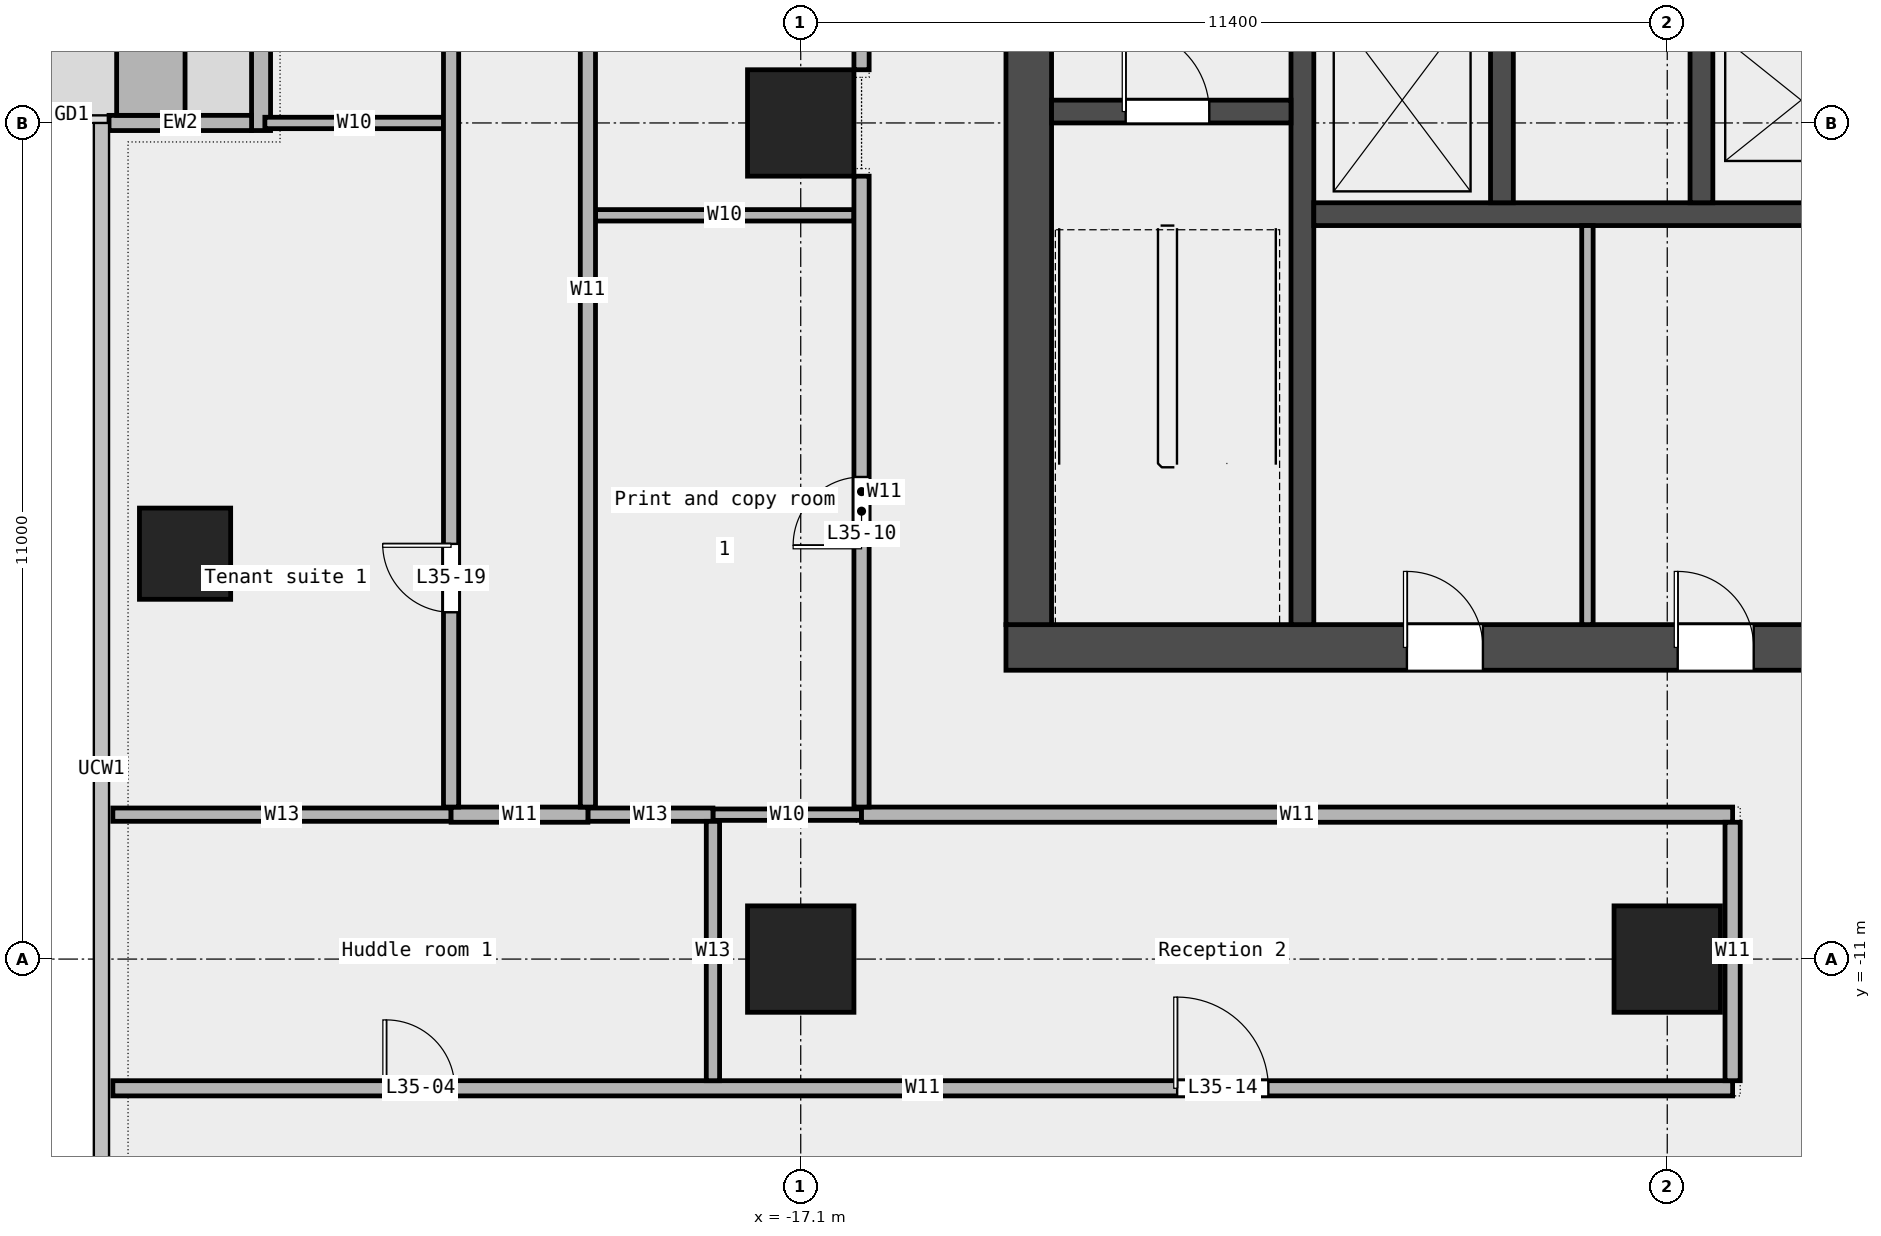
"""IFC4 building model, lengths in metres.
Left out: names, types, materials, properties, quantities, classifications, styles, units other than length and angle.
Written with IfcOpenShell. Run it as: python <this file> out.ifc"""

import sys

from ifc_helpers import new_model, si_unit, direction, frame, frame_2d, origin, origin_2d, place, context, subcontext, project, spatial, rectangle, extrude, element, fill, save


model = new_model("IFC4")
c1 = context("Model", 3, precision=1e-05, world=origin(), true_north=direction((0.0, 1.0)))
c2 = subcontext(c1, "Body", "Model", "MODEL_VIEW")
j1 = project(units=[si_unit("LENGTHUNIT", "METRE"), si_unit("PLANEANGLEUNIT", "RADIAN")], contexts=[c1])
p1 = place(None, origin())
s1 = spatial("IfcSite", under=j1, at=p1, CompositionType="ELEMENT")
p2 = place(p1, origin())
s2 = spatial("IfcBuilding", under=s1, at=p2, CompositionType="ELEMENT")
p3 = place(p2, frame((0.0, 0.0, 173.0)))
s3 = spatial("IfcBuildingStorey", under=s2, at=p3, CompositionType="ELEMENT", Elevation=173.0)
p4 = place(p3, frame((-25.2, -5.667, 0.0), z_axis=(0.0, 0.0, 1.0), x_axis=(1.0, 0.0, 0.0)))
e1 = element("IfcColumn", 1, at=p4, inside=s3, PredefinedType="COLUMN", context=c2, shape_type="SweptSolid", body=[
    extrude(rectangle(XDim=1.2, YDim=1.2, at=origin_2d()), origin(), (0.0, 0.0, 1.0), 3.6),
])
for number, where, z_axis, x_axis in (
    (2, (-17.1, -11.0, 0.0), (0.0, 0.0, 1.0), (1.0, 0.0, 0.0)),
    (3, (-17.1, 0.0, 0.0), (0.0, 0.0, 1.0), (1.0, 0.0, 0.0)),
    (4, (-5.7, -11.0, 0.0), (0.0, 0.0, 1.0), (1.0, 0.0, 0.0)),
):
    element("IfcColumn", number, at=place(p3, frame(where, z_axis=z_axis, x_axis=x_axis)), inside=s3, PredefinedType="COLUMN", context=c2, shape_type="SweptSolid", body=[
        extrude(rectangle(XDim=1.4, YDim=1.4, at=origin_2d()), origin(), (0.0, 0.0, 1.0), 3.6),
    ])
p5 = place(p3, frame((-24.2, 12.85, 0.0), z_axis=(0.0, 0.0, 1.0), x_axis=(0.0, -1.0, 0.0)))
e5 = element("IfcWall", 5, at=p5, inside=s3, PredefinedType="STANDARD", context=c2, shape_type="SweptSolid", body=[
    extrude(rectangle(XDim=12.95, YDim=0.25, at=frame_2d((6.475, 0.0))), origin(), (0.0, 0.0, 1.0), 3.6),
])
p6 = place(p5, frame((1.5, 0.0, 0.45)))
e6 = element("IfcOpeningElement", 6, at=p6, cuts=e5, PredefinedType="OPENING", context=c2, shape_type="SweptSolid", body=[
    extrude(rectangle(XDim=1.5, YDim=2.4, at=frame_2d((0.75, 1.2))), frame((0.0, 0.137, 0.0), z_axis=(0.0, -1.0, 0.0), x_axis=(1.0, 0.0, 0.0)), (0.0, 0.0, 1.0), 0.274),
])
p7 = place(p5, frame((4.25, 0.0, 0.0)))
e7 = element("IfcOpeningElement", 7, at=p7, cuts=e5, PredefinedType="OPENING", context=c2, shape_type="SweptSolid", body=[
    extrude(rectangle(XDim=1.8, YDim=2.4, at=frame_2d((0.9, 1.2))), frame((0.0, 0.137, 0.0), z_axis=(0.0, -1.0, 0.0), x_axis=(1.0, 0.0, 0.0)), (0.0, 0.0, 1.0), 0.274),
])
p8 = place(p5, frame((10.0, 0.0, 0.45)))
e8 = element("IfcOpeningElement", 8, at=p8, cuts=e5, PredefinedType="OPENING", context=c2, shape_type="SweptSolid", body=[
    extrude(rectangle(XDim=1.5, YDim=2.4, at=frame_2d((0.75, 1.2))), frame((0.0, 0.137, 0.0), z_axis=(0.0, -1.0, 0.0), x_axis=(1.0, 0.0, 0.0)), (0.0, 0.0, 1.0), 0.274),
])
p9 = place(p3, frame((-26.2, 0.0, 0.0), z_axis=(0.0, 0.0, 1.0), x_axis=(1.0, 0.0, 0.0)))
e9 = element("IfcWall", 9, at=p9, inside=s3, PredefinedType="STANDARD", context=c2, shape_type="SweptSolid", body=[
    extrude(rectangle(XDim=1.875, YDim=0.2, at=frame_2d((0.938, 0.0))), origin(), (0.0, 0.0, 1.0), 3.6),
])
p10 = place(p3, frame((-25.65, 3.7, 0.0), z_axis=(0.0, 0.0, 1.0), x_axis=(0.0, -1.0, 0.0)))
e10 = element("IfcWall", 10, at=p10, inside=s3, PredefinedType="STANDARD", context=c2, shape_type="SweptSolid", body=[
    extrude(rectangle(XDim=3.6, YDim=0.9, at=frame_2d((1.8, 0.0))), origin(), (0.0, 0.0, 1.0), 0.7),
])
p11 = place(p3, frame((-26.15, -12.7, 0.0), z_axis=(0.0, 0.0, 1.0), x_axis=(1.0, 0.0, 0.0)))
e11 = element("IfcWall", 11, at=p11, inside=s3, PredefinedType="PARTITIONING", context=c2, shape_type="SweptSolid", body=[
    extrude(rectangle(XDim=21.31, YDim=0.2, at=frame_2d((10.655, 0.0))), origin(), (0.0, 0.0, 1.0), 3.6),
])
p12 = place(p11, frame((3.597, 0.0, 0.0)))
e12 = element("IfcOpeningElement", 12, at=p12, cuts=e11, PredefinedType="OPENING", context=c2, shape_type="SweptSolid", body=[
    extrude(rectangle(XDim=0.9, YDim=2.1, at=frame_2d((0.45, 1.05))), frame((0.0, 0.112, 0.0), z_axis=(0.0, -1.0, 0.0), x_axis=(1.0, 0.0, 0.0)), (0.0, 0.0, 1.0), 0.224),
])
p13 = place(p11, frame((14.002, 0.0, 0.0)))
e13 = element("IfcOpeningElement", 13, at=p13, cuts=e11, PredefinedType="OPENING", context=c2, shape_type="SweptSolid", body=[
    extrude(rectangle(XDim=1.2, YDim=2.1, at=frame_2d((0.6, 1.05))), frame((0.0, 0.112, 0.0), z_axis=(0.0, -1.0, 0.0), x_axis=(1.0, 0.0, 0.0)), (0.0, 0.0, 1.0), 0.224),
])
p14 = place(p3, frame((-18.255, -9.1, 0.0), z_axis=(0.0, 0.0, 1.0), x_axis=(1.0, 0.0, 0.0)))
e14 = element("IfcWall", 14, at=p14, inside=s3, PredefinedType="PARTITIONING", context=c2, shape_type="SweptSolid", body=[
    extrude(rectangle(XDim=1.955, YDim=0.15, at=frame_2d((0.978, 0.0))), origin(), (0.0, 0.0, 1.0), 3.6),
])
p15 = place(p3, frame((-26.15, -9.1, 0.0), z_axis=(0.0, 0.0, 1.0), x_axis=(1.0, 0.0, 0.0)))
e15 = element("IfcWall", 15, at=p15, inside=s3, PredefinedType="PARTITIONING", context=c2, shape_type="SweptSolid", body=[
    extrude(rectangle(XDim=4.45, YDim=0.175, at=frame_2d((2.225, 0.0))), origin(), (0.0, 0.0, 1.0), 3.6),
])
p16 = place(p3, frame((-19.9, -9.1, 0.0), z_axis=(0.0, 0.0, 1.0), x_axis=(1.0, 0.0, 0.0)))
e16 = element("IfcWall", 16, at=p16, inside=s3, PredefinedType="PARTITIONING", context=c2, shape_type="SweptSolid", body=[
    extrude(rectangle(XDim=1.645, YDim=0.175, at=frame_2d((0.823, 0.0))), origin(), (0.0, 0.0, 1.0), 3.6),
])
p17 = place(p3, frame((-21.7, -9.1, 0.0), z_axis=(0.0, 0.0, 1.0), x_axis=(1.0, 0.0, 0.0)))
e17 = element("IfcWall", 17, at=p17, inside=s3, PredefinedType="PARTITIONING", context=c2, shape_type="SweptSolid", body=[
    extrude(rectangle(XDim=1.8, YDim=0.2, at=frame_2d((0.9, 0.0))), origin(), (0.0, 0.0, 1.0), 3.6),
])
p18 = place(p3, frame((-16.3, -9.1, 0.0), z_axis=(0.0, 0.0, 1.0), x_axis=(1.0, 0.0, 0.0)))
e18 = element("IfcWall", 18, at=p18, inside=s3, PredefinedType="PARTITIONING", context=c2, shape_type="SweptSolid", body=[
    extrude(rectangle(XDim=11.46, YDim=0.2, at=frame_2d((5.73, 0.0))), origin(), (0.0, 0.0, 1.0), 3.6),
])
p19 = place(p3, frame((-19.8, -1.215, 0.0), z_axis=(0.0, 0.0, 1.0), x_axis=(1.0, 0.0, 0.0)))
e19 = element("IfcWall", 19, at=p19, inside=s3, PredefinedType="PARTITIONING", context=c2, shape_type="SweptSolid", body=[
    extrude(rectangle(XDim=3.4, YDim=0.15, at=frame_2d((1.7, 0.0))), origin(), (0.0, 0.0, 1.0), 3.6),
])
p20 = place(p3, frame((-24.15, 0.0, 0.0), z_axis=(0.0, 0.0, 1.0), x_axis=(1.0, 0.0, 0.0)))
e20 = element("IfcWall", 20, at=p20, inside=s3, PredefinedType="PARTITIONING", context=c2, shape_type="SweptSolid", body=[
    extrude(rectangle(XDim=2.35, YDim=0.15, at=frame_2d((1.175, 0.0))), origin(), (0.0, 0.0, 1.0), 3.6),
])
p21 = place(p3, frame((-21.7, -9.0, 0.0), z_axis=(0.0, 0.0, 1.0), x_axis=(0.0, 1.0, 0.0)))
e21 = element("IfcWall", 21, at=p21, inside=s3, PredefinedType="PARTITIONING", context=c2, shape_type="SweptSolid", body=[
    extrude(rectangle(XDim=24.3, YDim=0.2, at=frame_2d((12.15, 0.0))), origin(), (0.0, 0.0, 1.0), 3.6),
])
p22 = place(p21, frame((14.925, 0.0, 0.0)))
e22 = element("IfcOpeningElement", 22, at=p22, cuts=e21, PredefinedType="OPENING", context=c2, shape_type="SweptSolid", body=[
    extrude(rectangle(XDim=0.9, YDim=2.1, at=frame_2d((0.45, 1.05))), frame((0.0, 0.112, 0.0), z_axis=(0.0, -1.0, 0.0), x_axis=(1.0, 0.0, 0.0)), (0.0, 0.0, 1.0), 0.224),
])
p23 = place(p21, frame((2.562, 0.0, 0.0)))
e23 = element("IfcOpeningElement", 23, at=p23, cuts=e21, PredefinedType="OPENING", context=c2, shape_type="SweptSolid", body=[
    extrude(rectangle(XDim=0.9, YDim=2.1, at=frame_2d((0.45, 1.05))), frame((0.0, 0.112, 0.0), z_axis=(0.0, -1.0, 0.0), x_axis=(1.0, 0.0, 0.0)), (0.0, 0.0, 1.0), 0.224),
])
p24 = place(p3, frame((-19.9, -9.0, 0.0), z_axis=(0.0, 0.0, 1.0), x_axis=(0.0, 1.0, 0.0)))
e24 = element("IfcWall", 24, at=p24, inside=s3, PredefinedType="PARTITIONING", context=c2, shape_type="SweptSolid", body=[
    extrude(rectangle(XDim=13.6, YDim=0.2, at=frame_2d((6.8, 0.0))), origin(), (0.0, 0.0, 1.0), 3.6),
])
p25 = place(p3, frame((-18.255, -12.6, 0.0), z_axis=(0.0, 0.0, 1.0), x_axis=(0.0, 1.0, 0.0)))
e25 = element("IfcWall", 25, at=p25, inside=s3, PredefinedType="PARTITIONING", context=c2, shape_type="SweptSolid", body=[
    extrude(rectangle(XDim=3.412, YDim=0.175, at=frame_2d((1.706, 0.0))), origin(), (0.0, 0.0, 1.0), 3.6),
])
p26 = place(p3, frame((-16.3, -9.0, 0.0), z_axis=(0.0, 0.0, 1.0), x_axis=(0.0, 1.0, 0.0)))
e26 = element("IfcWall", 26, at=p26, inside=s3, PredefinedType="PARTITIONING", context=c2, shape_type="SweptSolid", body=[
    extrude(rectangle(XDim=8.3, YDim=0.2, at=frame_2d((4.15, 0.0))), origin(), (0.0, 0.0, 1.0), 3.6),
])
p27 = place(p26, frame((3.442, 0.0, 0.0)))
e27 = element("IfcOpeningElement", 27, at=p27, cuts=e26, PredefinedType="OPENING", context=c2, shape_type="SweptSolid", body=[
    extrude(rectangle(XDim=0.9, YDim=2.1, at=frame_2d((0.45, 1.05))), frame((0.0, 0.112, 0.0), z_axis=(0.0, -1.0, 0.0), x_axis=(1.0, 0.0, 0.0)), (0.0, 0.0, 1.0), 0.224),
])
p28 = place(p3, frame((-16.3, 0.7, 0.0), z_axis=(0.0, 0.0, 1.0), x_axis=(0.0, 1.0, 0.0)))
e28 = element("IfcWall", 28, at=p28, inside=s3, PredefinedType="PARTITIONING", context=c2, shape_type="SweptSolid", body=[
    extrude(rectangle(XDim=3.9, YDim=0.2, at=frame_2d((1.95, 0.0))), origin(), (0.0, 0.0, 1.0), 3.6),
])
p29 = place(p28, frame((1.5, 0.0, 0.0)))
e29 = element("IfcOpeningElement", 29, at=p29, cuts=e28, PredefinedType="OPENING", context=c2, shape_type="SweptSolid", body=[
    extrude(rectangle(XDim=0.9, YDim=2.1, at=frame_2d((0.45, 1.05))), frame((0.0, 0.112, 0.0), z_axis=(0.0, -1.0, 0.0), x_axis=(1.0, 0.0, 0.0)), (0.0, 0.0, 1.0), 0.224),
])
p30 = place(p3, frame((-4.84, -12.6, 0.0), z_axis=(0.0, 0.0, 1.0), x_axis=(0.0, 1.0, 0.0)))
e30 = element("IfcWall", 30, at=p30, inside=s3, PredefinedType="PARTITIONING", context=c2, shape_type="SweptSolid", body=[
    extrude(rectangle(XDim=3.4, YDim=0.2, at=frame_2d((1.7, 0.0))), origin(), (0.0, 0.0, 1.0), 3.6),
])
p31 = place(p3, frame((-14.4, -6.9, 0.0), z_axis=(0.0, 0.0, 1.0), x_axis=(1.0, 0.0, 0.0)))
e31 = element("IfcWall", 31, at=p31, inside=s3, PredefinedType="SHEAR", context=c2, shape_type="SweptSolid", body=[
    extrude(rectangle(XDim=28.8, YDim=0.6, at=frame_2d((14.4, 0.0))), origin(), (0.0, 0.0, 1.0), 3.7),
])
p32 = place(p31, frame((5.275, 0.0, 0.0)))
e32 = element("IfcOpeningElement", 32, at=p32, cuts=e31, PredefinedType="OPENING", context=c2, shape_type="SweptSolid", body=[
    extrude(rectangle(XDim=1.0, YDim=2.1, at=frame_2d((0.5, 1.05))), frame((0.0, 0.312, 0.0), z_axis=(0.0, -1.0, 0.0), x_axis=(1.0, 0.0, 0.0)), (0.0, 0.0, 1.0), 0.624),
])
p33 = place(p31, frame((8.837, 0.0, 0.0)))
e33 = element("IfcOpeningElement", 33, at=p33, cuts=e31, PredefinedType="OPENING", context=c2, shape_type="SweptSolid", body=[
    extrude(rectangle(XDim=1.0, YDim=2.1, at=frame_2d((0.5, 1.05))), frame((0.0, 0.312, 0.0), z_axis=(0.0, -1.0, 0.0), x_axis=(1.0, 0.0, 0.0)), (0.0, 0.0, 1.0), 0.624),
])
p34 = place(p31, frame((13.425, 0.0, 0.0)))
e34 = element("IfcOpeningElement", 34, at=p34, cuts=e31, PredefinedType="OPENING", context=c2, shape_type="SweptSolid", body=[
    extrude(rectangle(XDim=1.2, YDim=2.1, at=frame_2d((0.6, 1.05))), frame((0.0, 0.312, 0.0), z_axis=(0.0, -1.0, 0.0), x_axis=(1.0, 0.0, 0.0)), (0.0, 0.0, 1.0), 0.624),
])
p35 = place(p31, frame((18.75, 0.0, 0.0)))
e35 = element("IfcOpeningElement", 35, at=p35, cuts=e31, PredefinedType="OPENING", context=c2, shape_type="SweptSolid", body=[
    extrude(rectangle(XDim=1.8, YDim=2.1, at=frame_2d((0.9, 1.05))), frame((0.0, 0.312, 0.0), z_axis=(0.0, -1.0, 0.0), x_axis=(1.0, 0.0, 0.0)), (0.0, 0.0, 1.0), 0.624),
])
p36 = place(p31, frame((23.087, 0.0, 0.0)))
e36 = element("IfcOpeningElement", 36, at=p36, cuts=e31, PredefinedType="OPENING", context=c2, shape_type="SweptSolid", body=[
    extrude(rectangle(XDim=1.0, YDim=2.1, at=frame_2d((0.5, 1.05))), frame((0.0, 0.312, 0.0), z_axis=(0.0, -1.0, 0.0), x_axis=(1.0, 0.0, 0.0)), (0.0, 0.0, 1.0), 0.624),
])
p37 = place(p3, frame((-14.1, -6.6, 0.0), z_axis=(0.0, 0.0, 1.0), x_axis=(0.0, 1.0, 0.0)))
e37 = element("IfcWall", 37, at=p37, inside=s3, PredefinedType="SHEAR", context=c2, shape_type="SweptSolid", body=[
    extrude(rectangle(XDim=19.5, YDim=0.6, at=frame_2d((9.75, 0.0))), origin(), (0.0, 0.0, 1.0), 3.7),
])
p38 = place(p37, frame((9.3, 0.0, 0.0)))
e38 = element("IfcOpeningElement", 38, at=p38, cuts=e37, PredefinedType="OPENING", context=c2, shape_type="SweptSolid", body=[
    extrude(rectangle(XDim=1.8, YDim=2.1, at=frame_2d((0.9, 1.05))), frame((0.0, 0.312, 0.0), z_axis=(0.0, -1.0, 0.0), x_axis=(1.0, 0.0, 0.0)), (0.0, 0.0, 1.0), 0.624),
])
p39 = place(p3, frame((-10.5, -6.6, 0.0), z_axis=(0.0, 0.0, 1.0), x_axis=(0.0, 1.0, 0.0)))
e39 = element("IfcWall", 39, at=p39, inside=s3, PredefinedType="SHEAR", context=c2, shape_type="SweptSolid", body=[
    extrude(rectangle(XDim=8.55, YDim=0.3, at=frame_2d((4.275, 0.0))), origin(), (0.0, 0.0, 1.0), 3.7),
])
p40 = place(p3, frame((-13.8, 0.15, 0.0), z_axis=(0.0, 0.0, 1.0), x_axis=(1.0, 0.0, 0.0)))
e40 = element("IfcWall", 40, at=p40, inside=s3, PredefinedType="SOLIDWALL", context=c2, shape_type="SweptSolid", body=[
    extrude(rectangle(XDim=3.15, YDim=0.3, at=frame_2d((1.575, 0.0))), origin(), (0.0, 0.0, 1.0), 3.7),
])
p41 = place(p40, frame((0.975, 0.0, 0.0)))
e41 = element("IfcOpeningElement", 41, at=p41, cuts=e40, PredefinedType="OPENING", context=c2, shape_type="SweptSolid", body=[
    extrude(rectangle(XDim=1.1, YDim=2.1, at=frame_2d((0.55, 1.05))), frame((0.0, 0.162, 0.0), z_axis=(0.0, -1.0, 0.0), x_axis=(1.0, 0.0, 0.0)), (0.0, 0.0, 1.0), 0.324),
])
p42 = place(p3, frame((-10.35, -1.2, 0.0), z_axis=(0.0, 0.0, 1.0), x_axis=(1.0, 0.0, 0.0)))
e42 = element("IfcWall", 42, at=p42, inside=s3, PredefinedType="SOLIDWALL", context=c2, shape_type="SweptSolid", body=[
    extrude(rectangle(XDim=20.7, YDim=0.3, at=frame_2d((10.35, 0.0))), origin(), (0.0, 0.0, 1.0), 3.7),
])
for number, where, z_axis, x_axis in (
    (43, (-7.875, -1.05, 0.0), (0.0, 0.0, 1.0), (0.0, 1.0, 0.0)),
    (44, (-5.25, -1.05, 0.0), (0.0, 0.0, 1.0), (0.0, 1.0, 0.0)),
):
    element("IfcWall", number, at=place(p3, frame(where, z_axis=z_axis, x_axis=x_axis)), inside=s3, PredefinedType="SOLIDWALL", context=c2, shape_type="SweptSolid", body=[
        extrude(rectangle(XDim=2.7, YDim=0.3, at=frame_2d((1.35, 0.0))), origin(), (0.0, 0.0, 1.0), 3.7),
    ])
p43 = place(p3, frame((-6.75, -6.6, 0.0), z_axis=(0.0, 0.0, 1.0), x_axis=(0.0, 1.0, 0.0)))
e45 = element("IfcWall", 45, at=p43, inside=s3, PredefinedType="PARTITIONING", context=c2, shape_type="SweptSolid", body=[
    extrude(rectangle(XDim=5.25, YDim=0.15, at=frame_2d((2.625, 0.0))), origin(), (0.0, 0.0, 1.0), 3.7),
])
p44 = place(p12, origin())
e46 = element("IfcDoor", 46, at=p44, inside=s3, OperationType="SINGLE_SWING_LEFT", PredefinedType="DOOR", context=c2, shape_type="SweptSolid", body=[
    extrude(rectangle(XDim=0.9, YDim=2.1, at=frame_2d((0.45, 1.05))), frame((0.0, 0.025, 0.0), z_axis=(0.0, -1.0, 0.0), x_axis=(1.0, 0.0, 0.0)), (0.0, 0.0, 1.0), 0.05),
])
fill(e12, e46)
p45 = place(p27, origin())
e47 = element("IfcDoor", 47, at=p45, inside=s3, OperationType="SINGLE_SWING_LEFT", PredefinedType="DOOR", context=c2, shape_type="SweptSolid", body=[
    extrude(rectangle(XDim=0.9, YDim=2.1, at=frame_2d((0.45, 1.05))), frame((0.0, 0.025, 0.0), z_axis=(0.0, -1.0, 0.0), x_axis=(1.0, 0.0, 0.0)), (0.0, 0.0, 1.0), 0.05),
])
fill(e27, e47)
p46 = place(p13, origin())
e48 = element("IfcDoor", 48, at=p46, inside=s3, OperationType="SINGLE_SWING_LEFT", PredefinedType="DOOR", context=c2, shape_type="SweptSolid", body=[
    extrude(rectangle(XDim=1.2, YDim=2.1, at=frame_2d((0.6, 1.05))), frame((0.0, 0.025, 0.0), z_axis=(0.0, -1.0, 0.0), x_axis=(1.0, 0.0, 0.0)), (0.0, 0.0, 1.0), 0.05),
])
fill(e13, e48)
p47 = place(p23, origin())
e49 = element("IfcDoor", 49, at=p47, inside=s3, OperationType="SINGLE_SWING_RIGHT", PredefinedType="DOOR", context=c2, shape_type="SweptSolid", body=[
    extrude(rectangle(XDim=0.9, YDim=2.1, at=frame_2d((0.45, 1.05))), frame((0.0, 0.025, 0.0), z_axis=(0.0, -1.0, 0.0), x_axis=(1.0, 0.0, 0.0)), (0.0, 0.0, 1.0), 0.05),
])
fill(e23, e49)
p48 = place(p41, origin())
e50 = element("IfcDoor", 50, at=p48, inside=s3, OperationType="SINGLE_SWING_LEFT", PredefinedType="DOOR", context=c2, shape_type="SweptSolid", body=[
    extrude(rectangle(XDim=1.1, YDim=2.1, at=frame_2d((0.55, 1.05))), frame((0.0, 0.025, 0.0), z_axis=(0.0, -1.0, 0.0), x_axis=(1.0, 0.0, 0.0)), (0.0, 0.0, 1.0), 0.05),
])
fill(e41, e50)
p49 = place(p32, origin())
e51 = element("IfcDoor", 51, at=p49, inside=s3, OperationType="SINGLE_SWING_LEFT", PredefinedType="DOOR", context=c2, shape_type="SweptSolid", body=[
    extrude(rectangle(XDim=1.0, YDim=2.1, at=frame_2d((0.5, 1.05))), frame((0.0, 0.025, 0.0), z_axis=(0.0, -1.0, 0.0), x_axis=(1.0, 0.0, 0.0)), (0.0, 0.0, 1.0), 0.05),
])
fill(e32, e51)
p50 = place(p33, origin())
e52 = element("IfcDoor", 52, at=p50, inside=s3, OperationType="SINGLE_SWING_LEFT", PredefinedType="DOOR", context=c2, shape_type="SweptSolid", body=[
    extrude(rectangle(XDim=1.0, YDim=2.1, at=frame_2d((0.5, 1.05))), frame((0.0, 0.025, 0.0), z_axis=(0.0, -1.0, 0.0), x_axis=(1.0, 0.0, 0.0)), (0.0, 0.0, 1.0), 0.05),
])
fill(e33, e52)
save(model, sys.argv[1])
